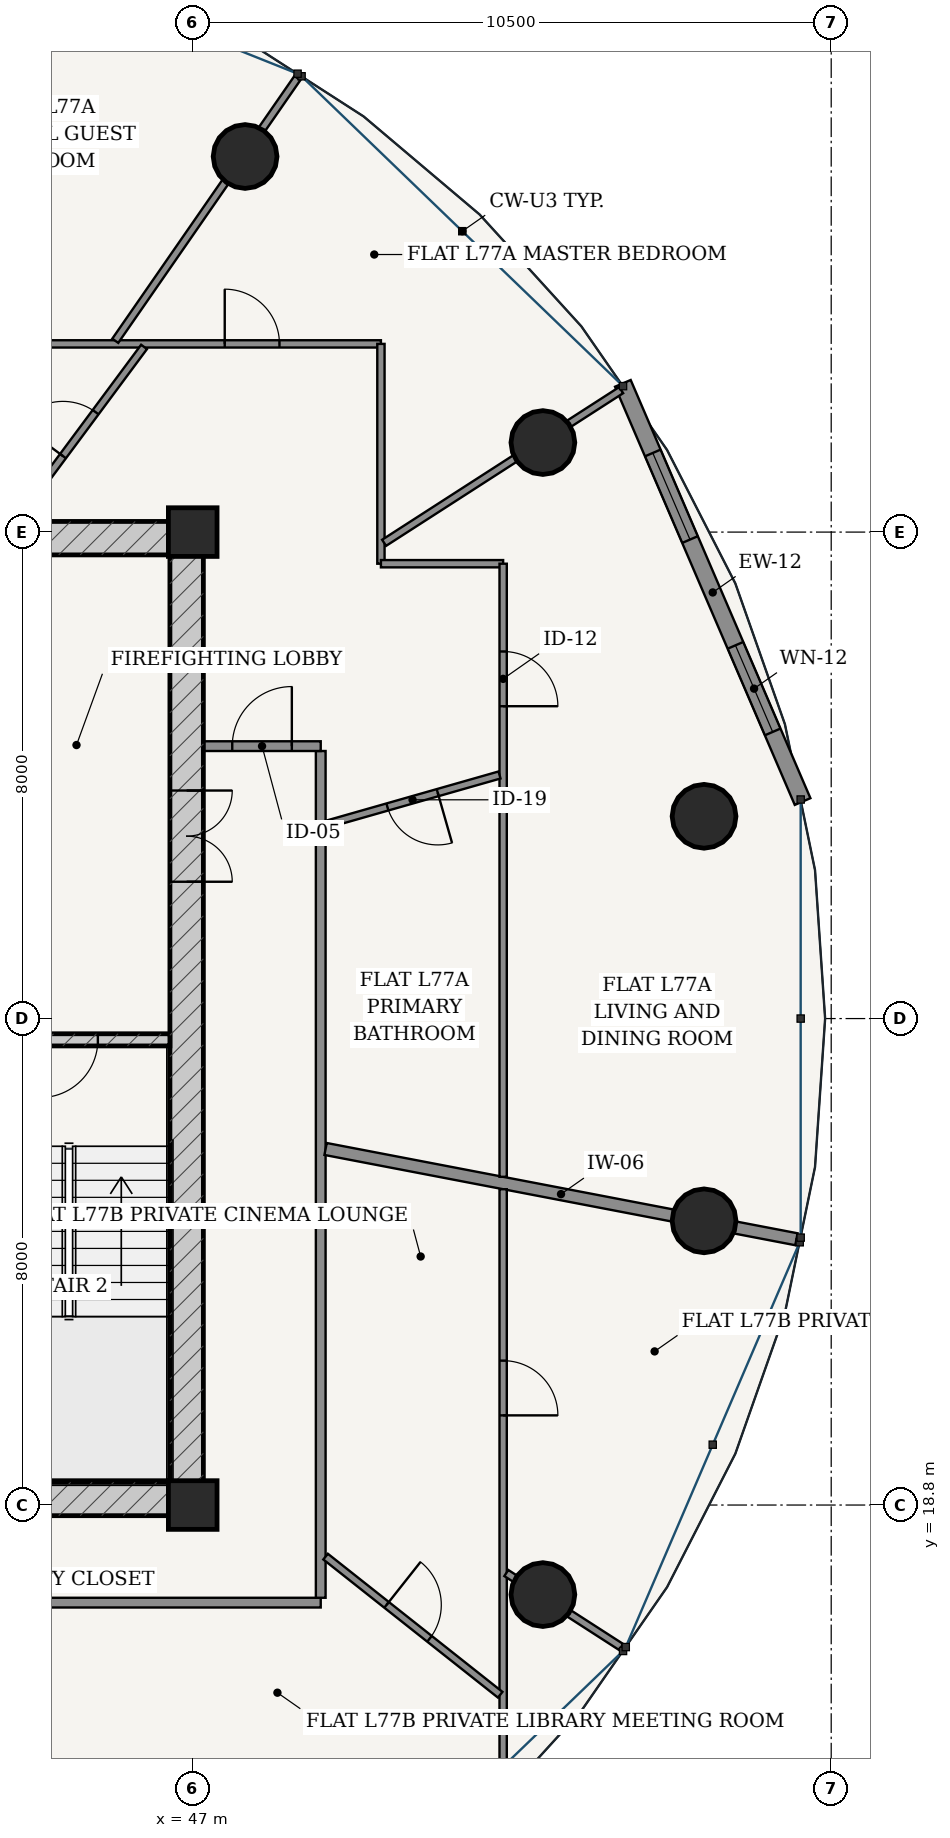
"""IFC4 building model, lengths in metres.
Left out: names, types, materials, properties, quantities, classifications, styles, units other than length and angle.
Written with IfcOpenShell. Run it as: python <this file> out.ifc"""

import sys

from ifc_helpers import new_model, si_unit, direction, frame, frame_2d, origin, origin_2d, place, context, subcontext, project, spatial, rectangle, hollow_circle, extrude, source, transform, mapped, element, fill, save


model = new_model("IFC4")
c1 = context("Model", 3, precision=1e-05, world=origin(), true_north=direction((-0.2419218956, 0.970295726276)))
c2 = subcontext(c1, "Body", "Model", "MODEL_VIEW")
j1 = project(units=[si_unit("LENGTHUNIT", "METRE"), si_unit("PLANEANGLEUNIT", "RADIAN")], contexts=[c1])
p1 = place(None, origin())
s1 = spatial("IfcSite", under=j1, at=p1, CompositionType="ELEMENT")
p2 = place(p1, origin())
s2 = spatial("IfcBuilding", under=s1, at=p2, CompositionType="ELEMENT")
p3 = place(p2, frame((0.0, 0.0, 293.2)))
s3 = spatial("IfcBuildingStorey", under=s2, at=p3, CompositionType="ELEMENT", Elevation=293.2)
for number, where, z_axis, x_axis in (
    (1, (47.0, 18.8, 0.0), (0.0, 0.0, 1.0), (1.0, 0.0, 0.0)),
    (2, (47.0, 34.8, 0.0), (0.0, 0.0, 1.0), (1.0, 0.0, 0.0)),
):
    element("IfcColumn", number, at=place(p3, frame(where, z_axis=z_axis, x_axis=x_axis)), inside=s3, PredefinedType="COLUMN", context=c2, shape_type="SweptSolid", body=[
        extrude(rectangle(XDim=0.8, YDim=0.8, at=origin_2d()), origin(), (0.0, 0.0, 1.0), 3.75),
    ])
p4 = place(p3, frame((28.825, 18.9, 0.0), z_axis=(0.0, 0.0, 1.0), x_axis=(1.0, 0.0, 0.0)))
e3 = element("IfcWall", 3, at=p4, inside=s3, PredefinedType="SHEAR", context=c2, shape_type="SweptSolid", body=[
    extrude(rectangle(XDim=18.35, YDim=0.55, at=frame_2d((9.175, 0.0))), origin(), (0.0, 0.0, 1.0), 3.49),
])
p5 = place(p4, frame((8.75, 0.0, 0.0)))
e4 = element("IfcOpeningElement", 4, at=p5, cuts=e3, PredefinedType="OPENING", context=c2, shape_type="SweptSolid", body=[
    extrude(rectangle(XDim=0.85, YDim=2.1, at=frame_2d((0.425, 1.05))), frame((0.0, 0.285, 0.0), z_axis=(0.0, -1.0, 0.0), x_axis=(1.0, 0.0, 0.0)), (0.0, 0.0, 1.0), 0.57),
])
p6 = place(p3, frame((28.825, 34.7, 0.0), z_axis=(0.0, 0.0, 1.0), x_axis=(1.0, 0.0, 0.0)))
e5 = element("IfcWall", 5, at=p6, inside=s3, PredefinedType="SHEAR", context=c2, shape_type="SweptSolid", body=[
    extrude(rectangle(XDim=18.35, YDim=0.55, at=frame_2d((9.175, 0.0))), origin(), (0.0, 0.0, 1.0), 3.49),
])
p7 = place(p3, frame((46.9, 19.175, 0.0), z_axis=(0.0, 0.0, 1.0), x_axis=(0.0, 1.0, 0.0)))
e6 = element("IfcWall", 6, at=p7, inside=s3, PredefinedType="SHEAR", context=c2, shape_type="SweptSolid", body=[
    extrude(rectangle(XDim=15.25, YDim=0.55, at=frame_2d((7.625, 0.0))), origin(), (0.0, 0.0, 1.0), 3.49),
])
p8 = place(p7, frame((9.875, 0.0, 0.0)))
e7 = element("IfcOpeningElement", 7, at=p8, cuts=e6, PredefinedType="OPENING", context=c2, shape_type="SweptSolid", body=[
    extrude(rectangle(XDim=1.5, YDim=2.2, at=frame_2d((0.75, 1.1))), frame((0.0, 0.285, 0.0), z_axis=(0.0, -1.0, 0.0), x_axis=(1.0, 0.0, 0.0)), (0.0, 0.0, 1.0), 0.57),
])
p9 = place(p3, frame((43.305, 26.45, 0.0), z_axis=(0.0, 0.0, 1.0), x_axis=(1.0, 0.0, 0.0)))
e8 = element("IfcWall", 8, at=p9, inside=s3, PredefinedType="SOLIDWALL", context=c2, shape_type="SweptSolid", body=[
    extrude(rectangle(XDim=3.32, YDim=0.2, at=frame_2d((1.66, 0.0))), origin(), (0.0, 0.0, 1.0), 3.49),
])
p10 = place(p9, frame((1.185, 0.0, 0.0)))
e9 = element("IfcOpeningElement", 9, at=p10, cuts=e8, PredefinedType="OPENING", context=c2, shape_type="SweptSolid", body=[
    extrude(rectangle(XDim=0.95, YDim=2.15, at=frame_2d((0.475, 1.075))), frame((0.0, 0.11, 0.0), z_axis=(0.0, -1.0, 0.0), x_axis=(1.0, 0.0, 0.0)), (0.0, 0.0, 1.0), 0.22),
])
for number, where, z_axis, x_axis in (
    (10, (55.409, 30.126, 0.0), (0.0, 0.0, 1.0), (1.0, 0.0, 0.0)),
    (11, (52.759, 36.272, 0.0), (0.0, 0.0, 1.0), (1.0, 0.0, 0.0)),
    (12, (47.861, 40.977, 0.0), (0.0, 0.0, 1.0), (1.0, 0.0, 0.0)),
    (13, (52.759, 17.328, 0.0), (0.0, 0.0, 1.0), (1.0, 0.0, 0.0)),
    (14, (55.409, 23.474, 0.0), (0.0, 0.0, 1.0), (1.0, 0.0, 0.0)),
):
    element("IfcColumn", number, at=place(p3, frame(where, z_axis=z_axis, x_axis=x_axis)), inside=s3, PredefinedType="COLUMN", context=c2, shape_type="SweptSolid", body=[
        extrude(hollow_circle(Radius=0.525, WallThickness=0.035, at=origin_2d()), origin(), (0.0, 0.0, 1.0), 3.75),
    ])
p11 = place(p3, frame((57.029, 30.369, 0.0), z_axis=(0.0, 0.0, 1.0), x_axis=(-0.394816612978, 0.918759948037, 0.0)))
e15 = element("IfcWall", 15, at=p11, inside=s3, PredefinedType="SOLIDWALL", context=c2, shape_type="SweptSolid", body=[
    extrude(rectangle(XDim=7.485, YDim=0.28, at=frame_2d((3.743, 0.0))), origin(), (0.0, 0.0, 1.0), 3.49),
])
p12 = place(p11, frame((1.246, 0.0, 0.85)))
e16 = element("IfcOpeningElement", 16, at=p12, cuts=e15, PredefinedType="OPENING", context=c2, shape_type="SweptSolid", body=[
    extrude(rectangle(XDim=1.55, YDim=1.95, at=frame_2d((0.775, 0.975))), frame((0.0, 0.15, 0.0), z_axis=(0.0, -1.0, 0.0), x_axis=(1.0, 0.0, 0.0)), (0.0, 0.0, 1.0), 0.3),
])
p13 = place(p11, frame((4.689, 0.0, 0.85)))
e17 = element("IfcOpeningElement", 17, at=p13, cuts=e15, PredefinedType="OPENING", context=c2, shape_type="SweptSolid", body=[
    extrude(rectangle(XDim=1.55, YDim=1.95, at=frame_2d((0.775, 0.975))), frame((0.0, 0.15, 0.0), z_axis=(0.0, -1.0, 0.0), x_axis=(1.0, 0.0, 0.0)), (0.0, 0.0, 1.0), 0.3),
])
p14 = place(p3, frame((26.895, 17.195, 0.0), z_axis=(0.0, 0.0, 1.0), x_axis=(1.0, 0.0, 0.0)))
e18 = element("IfcWall", 18, at=p14, inside=s3, PredefinedType="PARTITIONING", context=c2, shape_type="SweptSolid", body=[
    extrude(rectangle(XDim=22.21, YDim=0.16, at=frame_2d((11.105, 0.0))), origin(), (0.0, 0.0, 1.0), 3.015),
])
p15 = place(p14, frame((2.902, 0.0, 0.0)))
e19 = element("IfcOpeningElement", 19, at=p15, cuts=e18, PredefinedType="OPENING", context=c2, shape_type="SweptSolid", body=[
    extrude(rectangle(XDim=0.98, YDim=2.2, at=frame_2d((0.49, 1.1))), frame((0.0, 0.09, 0.0), z_axis=(0.0, -1.0, 0.0), x_axis=(1.0, 0.0, 0.0)), (0.0, 0.0, 1.0), 0.18),
])
p16 = place(p3, frame((49.105, 17.275, 0.0), z_axis=(0.0, 0.0, 1.0), x_axis=(0.0, 1.0, 0.0)))
e20 = element("IfcWall", 20, at=p16, inside=s3, PredefinedType="PARTITIONING", context=c2, shape_type="SweptSolid", body=[
    extrude(rectangle(XDim=13.925, YDim=0.16, at=frame_2d((6.962, 0.0))), origin(), (0.0, 0.0, 1.0), 3.015),
])
p17 = place(p3, frame((47.175, 31.28, 0.0), z_axis=(0.0, 0.0, 1.0), x_axis=(1.0, 0.0, 0.0)))
e21 = element("IfcWall", 21, at=p17, inside=s3, PredefinedType="PARTITIONING", context=c2, shape_type="SweptSolid", body=[
    extrude(rectangle(XDim=1.93, YDim=0.16, at=frame_2d((0.965, 0.0))), origin(), (0.0, 0.0, 1.0), 3.49),
])
p18 = place(p17, frame((0.475, 0.0, 0.0)))
e22 = element("IfcOpeningElement", 22, at=p18, cuts=e21, PredefinedType="OPENING", context=c2, shape_type="SweptSolid", body=[
    extrude(rectangle(XDim=0.98, YDim=2.2, at=frame_2d((0.49, 1.1))), frame((0.0, 0.09, 0.0), z_axis=(0.0, -1.0, 0.0), x_axis=(1.0, 0.0, 0.0)), (0.0, 0.0, 1.0), 0.18),
])
p19 = place(p3, frame((49.185, 24.656, 0.0), z_axis=(0.0, 0.0, 1.0), x_axis=(0.982109889803, -0.188308694305, 0.0)))
e23 = element("IfcWall", 23, at=p19, inside=s3, PredefinedType="PARTITIONING", context=c2, shape_type="SweptSolid", body=[
    extrude(rectangle(XDim=7.884, YDim=0.2, at=frame_2d((3.942, 0.0))), origin(), (0.0, 0.0, 1.0), 3.015),
])
p20 = place(p3, frame((25.905, 37.895, 0.0), z_axis=(0.0, 0.0, 1.0), x_axis=(1.0, 0.0, 0.0)))
e24 = element("IfcWall", 24, at=p20, inside=s3, PredefinedType="PARTITIONING", context=c2, shape_type="SweptSolid", body=[
    extrude(rectangle(XDim=24.19, YDim=0.12, at=frame_2d((12.095, 0.0))), origin(), (0.0, 0.0, 1.0), 3.015),
])
p21 = place(p20, frame((21.621, 0.0, 0.0)))
e25 = element("IfcOpeningElement", 25, at=p21, cuts=e24, PredefinedType="OPENING", context=c2, shape_type="SweptSolid", body=[
    extrude(rectangle(XDim=0.9, YDim=2.15, at=frame_2d((0.45, 1.075))), frame((0.0, 0.07, 0.0), z_axis=(0.0, -1.0, 0.0), x_axis=(1.0, 0.0, 0.0)), (0.0, 0.0, 1.0), 0.14),
])
p22 = place(p20, frame((16.661, 0.0, 0.0)))
e26 = element("IfcOpeningElement", 26, at=p22, cuts=e24, PredefinedType="OPENING", context=c2, shape_type="SweptSolid", body=[
    extrude(rectangle(XDim=0.9, YDim=2.15, at=frame_2d((0.45, 1.075))), frame((0.0, 0.07, 0.0), z_axis=(0.0, -1.0, 0.0), x_axis=(1.0, 0.0, 0.0)), (0.0, 0.0, 1.0), 0.14),
])
p23 = place(p20, frame((1.872, 0.0, 0.0)))
e27 = element("IfcOpeningElement", 27, at=p23, cuts=e24, PredefinedType="OPENING", context=c2, shape_type="SweptSolid", body=[
    extrude(rectangle(XDim=0.9, YDim=2.15, at=frame_2d((0.45, 1.075))), frame((0.0, 0.07, 0.0), z_axis=(0.0, -1.0, 0.0), x_axis=(1.0, 0.0, 0.0)), (0.0, 0.0, 1.0), 0.14),
])
p24 = place(p3, frame((50.095, 37.895, 0.0), z_axis=(0.0, 0.0, 1.0), x_axis=(0.0, -1.0, 0.0)))
e28 = element("IfcWall", 28, at=p24, inside=s3, PredefinedType="PARTITIONING", context=c2, shape_type="SweptSolid", body=[
    extrude(rectangle(XDim=3.615, YDim=0.12, at=frame_2d((1.808, 0.0))), origin(), (0.0, 0.0, 1.0), 3.015),
])
p25 = place(p3, frame((50.095, 34.28, 0.0), z_axis=(0.0, 0.0, 1.0), x_axis=(1.0, 0.0, 0.0)))
e29 = element("IfcWall", 29, at=p25, inside=s3, PredefinedType="PARTITIONING", context=c2, shape_type="SweptSolid", body=[
    extrude(rectangle(XDim=2.01, YDim=0.12, at=frame_2d((1.005, 0.0))), origin(), (0.0, 0.0, 1.0), 3.209),
])
p26 = place(p3, frame((52.105, 34.28, 0.0), z_axis=(0.0, 0.0, 1.0), x_axis=(0.0, -1.0, 0.0)))
e30 = element("IfcWall", 30, at=p26, inside=s3, PredefinedType="PARTITIONING", context=c2, shape_type="SweptSolid", body=[
    extrude(rectangle(XDim=10.083, YDim=0.12, at=frame_2d((5.041, 0.0))), origin(), (0.0, 0.0, 1.0), 3.015),
])
p27 = place(p26, frame((1.444, 0.0, 0.0)))
e31 = element("IfcOpeningElement", 31, at=p27, cuts=e30, PredefinedType="OPENING", context=c2, shape_type="SweptSolid", body=[
    extrude(rectangle(XDim=0.9, YDim=2.15, at=frame_2d((0.45, 1.075))), frame((0.0, 0.07, 0.0), z_axis=(0.0, -1.0, 0.0), x_axis=(1.0, 0.0, 0.0)), (0.0, 0.0, 1.0), 0.14),
])
p28 = place(p3, frame((50.147, 34.624, 0.0), z_axis=(0.0, 0.0, 1.0), x_axis=(0.840694066929, 0.541510374628, 0.0)))
e32 = element("IfcWall", 32, at=p28, inside=s3, PredefinedType="PARTITIONING", context=c2, shape_type="SweptSolid", body=[
    extrude(rectangle(XDim=4.637, YDim=0.12, at=frame_2d((2.319, 0.0))), origin(), (0.0, 0.0, 1.0), 3.015),
])
p29 = place(p3, frame((45.726, 37.946, 0.0), z_axis=(0.0, 0.0, 1.0), x_axis=(0.569678410446, 0.821867695357, 0.0)))
e33 = element("IfcWall", 33, at=p29, inside=s3, PredefinedType="PARTITIONING", context=c2, shape_type="SweptSolid", body=[
    extrude(rectangle(XDim=5.257, YDim=0.12, at=frame_2d((2.628, 0.0))), origin(), (0.0, 0.0, 1.0), 3.015),
])
p30 = place(p3, frame((49.185, 29.99, 0.0), z_axis=(0.0, 0.0, 1.0), x_axis=(0.961663207035, 0.274233251511, 0.0)))
e34 = element("IfcWall", 34, at=p30, inside=s3, PredefinedType="PARTITIONING", context=c2, shape_type="SweptSolid", body=[
    extrude(rectangle(XDim=2.974, YDim=0.12, at=frame_2d((1.487, 0.0))), origin(), (0.0, 0.0, 1.0), 3.209),
])
p31 = place(p30, frame((1.057, 0.0, 0.0)))
e35 = element("IfcOpeningElement", 35, at=p31, cuts=e34, PredefinedType="OPENING", context=c2, shape_type="SweptSolid", body=[
    extrude(rectangle(XDim=0.86, YDim=2.15, at=frame_2d((0.43, 1.075))), frame((0.0, 0.07, 0.0), z_axis=(0.0, -1.0, 0.0), x_axis=(1.0, 0.0, 0.0)), (0.0, 0.0, 1.0), 0.14),
])
p32 = place(p3, frame((44.07, 34.977, 0.0), z_axis=(0.0, 0.0, 1.0), x_axis=(0.596034582173, 0.802958764106, 0.0)))
e36 = element("IfcWall", 36, at=p32, inside=s3, PredefinedType="PARTITIONING", context=c2, shape_type="SweptSolid", body=[
    extrude(rectangle(XDim=3.573, YDim=0.12, at=frame_2d((1.786, 0.0))), origin(), (0.0, 0.0, 1.0), 3.49),
])
p33 = place(p32, frame((1.336, 0.0, 0.0)))
e37 = element("IfcOpeningElement", 37, at=p33, cuts=e36, PredefinedType="OPENING", context=c2, shape_type="SweptSolid", body=[
    extrude(rectangle(XDim=0.9, YDim=2.15, at=frame_2d((0.45, 1.075))), frame((0.0, 0.07, 0.0), z_axis=(0.0, -1.0, 0.0), x_axis=(1.0, 0.0, 0.0)), (0.0, 0.0, 1.0), 0.14),
])
p34 = place(p3, frame((52.105, 23.994, 0.0), z_axis=(0.0, 0.0, 1.0), x_axis=(0.0, -1.0, 0.0)))
e38 = element("IfcWall", 38, at=p34, inside=s3, PredefinedType="PARTITIONING", context=c2, shape_type="SweptSolid", body=[
    extrude(rectangle(XDim=9.605, YDim=0.12, at=frame_2d((4.803, 0.0))), origin(), (0.0, 0.0, 1.0), 3.015),
])
p35 = place(p34, frame((2.819, 0.0, 0.0)))
e39 = element("IfcOpeningElement", 39, at=p35, cuts=e38, PredefinedType="OPENING", context=c2, shape_type="SweptSolid", body=[
    extrude(rectangle(XDim=0.9, YDim=2.15, at=frame_2d((0.45, 1.075))), frame((0.0, 0.07, 0.0), z_axis=(0.0, -1.0, 0.0), x_axis=(1.0, 0.0, 0.0)), (0.0, 0.0, 1.0), 0.14),
])
p36 = place(p3, frame((52.157, 17.682, 0.0), z_axis=(0.0, 0.0, 1.0), x_axis=(0.840690872836, -0.541515333421, 0.0)))
e40 = element("IfcWall", 40, at=p36, inside=s3, PredefinedType="PARTITIONING", context=c2, shape_type="SweptSolid", body=[
    extrude(rectangle(XDim=2.247, YDim=0.12, at=frame_2d((1.123, 0.0))), origin(), (0.0, 0.0, 1.0), 3.015),
])
p37 = place(p3, frame((49.185, 17.952, 0.0), z_axis=(0.0, 0.0, 1.0), x_axis=(0.784266179732, -0.620424499297, 0.0)))
e41 = element("IfcWall", 41, at=p37, inside=s3, PredefinedType="PARTITIONING", context=c2, shape_type="SweptSolid", body=[
    extrude(rectangle(XDim=3.661, YDim=0.12, at=frame_2d((1.831, 0.0))), origin(), (0.0, 0.0, 1.0), 3.121),
])
p38 = place(p37, frame((1.279, 0.0, 0.0)))
e42 = element("IfcOpeningElement", 42, at=p38, cuts=e41, PredefinedType="OPENING", context=c2, shape_type="SweptSolid", body=[
    extrude(rectangle(XDim=0.9, YDim=2.15, at=frame_2d((0.45, 1.075))), frame((0.0, 0.07, 0.0), z_axis=(0.0, -1.0, 0.0), x_axis=(1.0, 0.0, 0.0)), (0.0, 0.0, 1.0), 0.14),
])
m1 = source(origin(), c2, "Body", "SweptSolid", [
    extrude(rectangle(XDim=1.55, YDim=1.95, at=frame_2d((0.775, 0.975))), frame((0.0, 0.03, 0.0), z_axis=(0.0, -1.0, 0.0), x_axis=(1.0, 0.0, 0.0)), (0.0, 0.0, 1.0), 0.06),
])
p39 = place(p12, origin())
e43 = element("IfcWindow", 43, at=p39, inside=s3, PartitioningType="SINGLE_PANEL", PredefinedType="WINDOW", context=c2, shape_type="MappedRepresentation", body=[
    mapped(m1, transform((0.0, 0.0, 0.0), scale=1.0)),
])
fill(e16, e43)
p40 = place(p13, origin())
e44 = element("IfcWindow", 44, at=p40, inside=s3, PartitioningType="SINGLE_PANEL", PredefinedType="WINDOW", context=c2, shape_type="MappedRepresentation", body=[
    mapped(m1, transform((0.0, 0.0, 0.0), scale=1.0)),
])
fill(e17, e44)
m2 = source(origin(), c2, "Body", "SweptSolid", [
    extrude(rectangle(XDim=1.5, YDim=2.2, at=frame_2d((0.75, 1.1))), frame((0.0, 0.025, 0.0), z_axis=(0.0, -1.0, 0.0), x_axis=(1.0, 0.0, 0.0)), (0.0, 0.0, 1.0), 0.05),
])
p41 = place(p8, frame((1.5, 0.0, 0.0), z_axis=(0.0, 0.0, 1.0), x_axis=(-1.0, 0.0, 0.0)))
e45 = element("IfcDoor", 45, at=p41, inside=s3, OperationType="DOUBLE_DOOR_SINGLE_SWING", PredefinedType="DOOR", context=c2, shape_type="MappedRepresentation", body=[
    mapped(m2, transform((0.0, 0.0, 0.0), scale=1.0)),
])
fill(e7, e45)
m3 = source(origin(), c2, "Body", "SweptSolid", [
    extrude(rectangle(XDim=0.95, YDim=2.15, at=frame_2d((0.475, 1.075))), frame((0.0, 0.025, 0.0), z_axis=(0.0, -1.0, 0.0), x_axis=(1.0, 0.0, 0.0)), (0.0, 0.0, 1.0), 0.05),
])
p42 = place(p10, frame((0.95, 0.0, 0.0), z_axis=(0.0, 0.0, 1.0), x_axis=(-1.0, 0.0, 0.0)))
e46 = element("IfcDoor", 46, at=p42, inside=s3, OperationType="SINGLE_SWING_RIGHT", PredefinedType="DOOR", context=c2, shape_type="MappedRepresentation", body=[
    mapped(m3, transform((0.0, 0.0, 0.0), scale=1.0)),
])
fill(e9, e46)
m4 = source(origin(), c2, "Body", "SweptSolid", [
    extrude(rectangle(XDim=0.98, YDim=2.2, at=frame_2d((0.49, 1.1))), frame((0.0, 0.025, 0.0), z_axis=(0.0, -1.0, 0.0), x_axis=(1.0, 0.0, 0.0)), (0.0, 0.0, 1.0), 0.05),
])
p43 = place(p18, origin())
e47 = element("IfcDoor", 47, at=p43, inside=s3, OperationType="SINGLE_SWING_RIGHT", PredefinedType="DOOR", context=c2, shape_type="MappedRepresentation", body=[
    mapped(m4, transform((0.0, 0.0, 0.0), scale=1.0)),
])
fill(e22, e47)
m5 = source(origin(), c2, "Body", "SweptSolid", [
    extrude(rectangle(XDim=0.86, YDim=2.15, at=frame_2d((0.43, 1.075))), frame((0.0, 0.025, 0.0), z_axis=(0.0, -1.0, 0.0), x_axis=(1.0, 0.0, 0.0)), (0.0, 0.0, 1.0), 0.05),
])
p44 = place(p31, frame((0.86, 0.0, 0.0), z_axis=(0.0, 0.0, 1.0), x_axis=(-1.0, 0.0, 0.0)))
e48 = element("IfcDoor", 48, at=p44, inside=s3, OperationType="SINGLE_SWING_LEFT", PredefinedType="DOOR", context=c2, shape_type="MappedRepresentation", body=[
    mapped(m5, transform((0.0, 0.0, 0.0), scale=1.0)),
])
fill(e35, e48)
m6 = source(origin(), c2, "Body", "SweptSolid", [
    extrude(rectangle(XDim=0.9, YDim=2.15, at=frame_2d((0.45, 1.075))), frame((0.0, 0.025, 0.0), z_axis=(0.0, -1.0, 0.0), x_axis=(1.0, 0.0, 0.0)), (0.0, 0.0, 1.0), 0.05),
])
p45 = place(p27, origin())
e49 = element("IfcDoor", 49, at=p45, inside=s3, OperationType="SINGLE_SWING_RIGHT", PredefinedType="DOOR", context=c2, shape_type="MappedRepresentation", body=[
    mapped(m6, transform((0.0, 0.0, 0.0), scale=1.0)),
])
fill(e31, e49)
p46 = place(p33, origin())
e50 = element("IfcDoor", 50, at=p46, inside=s3, OperationType="SINGLE_SWING_LEFT", PredefinedType="DOOR", context=c2, shape_type="MappedRepresentation", body=[
    mapped(m6, transform((0.0, 0.0, 0.0), scale=1.0)),
])
fill(e37, e50)
p47 = place(p21, origin())
e51 = element("IfcDoor", 51, at=p47, inside=s3, OperationType="SINGLE_SWING_LEFT", PredefinedType="DOOR", context=c2, shape_type="MappedRepresentation", body=[
    mapped(m6, transform((0.0, 0.0, 0.0), scale=1.0)),
])
fill(e25, e51)
p48 = place(p38, origin())
e52 = element("IfcDoor", 52, at=p48, inside=s3, OperationType="SINGLE_SWING_LEFT", PredefinedType="DOOR", context=c2, shape_type="MappedRepresentation", body=[
    mapped(m6, transform((0.0, 0.0, 0.0), scale=1.0)),
])
fill(e42, e52)
p49 = place(p35, origin())
e53 = element("IfcDoor", 53, at=p49, inside=s3, OperationType="SINGLE_SWING_RIGHT", PredefinedType="DOOR", context=c2, shape_type="MappedRepresentation", body=[
    mapped(m6, transform((0.0, 0.0, 0.0), scale=1.0)),
])
fill(e39, e53)
save(model, sys.argv[1])
